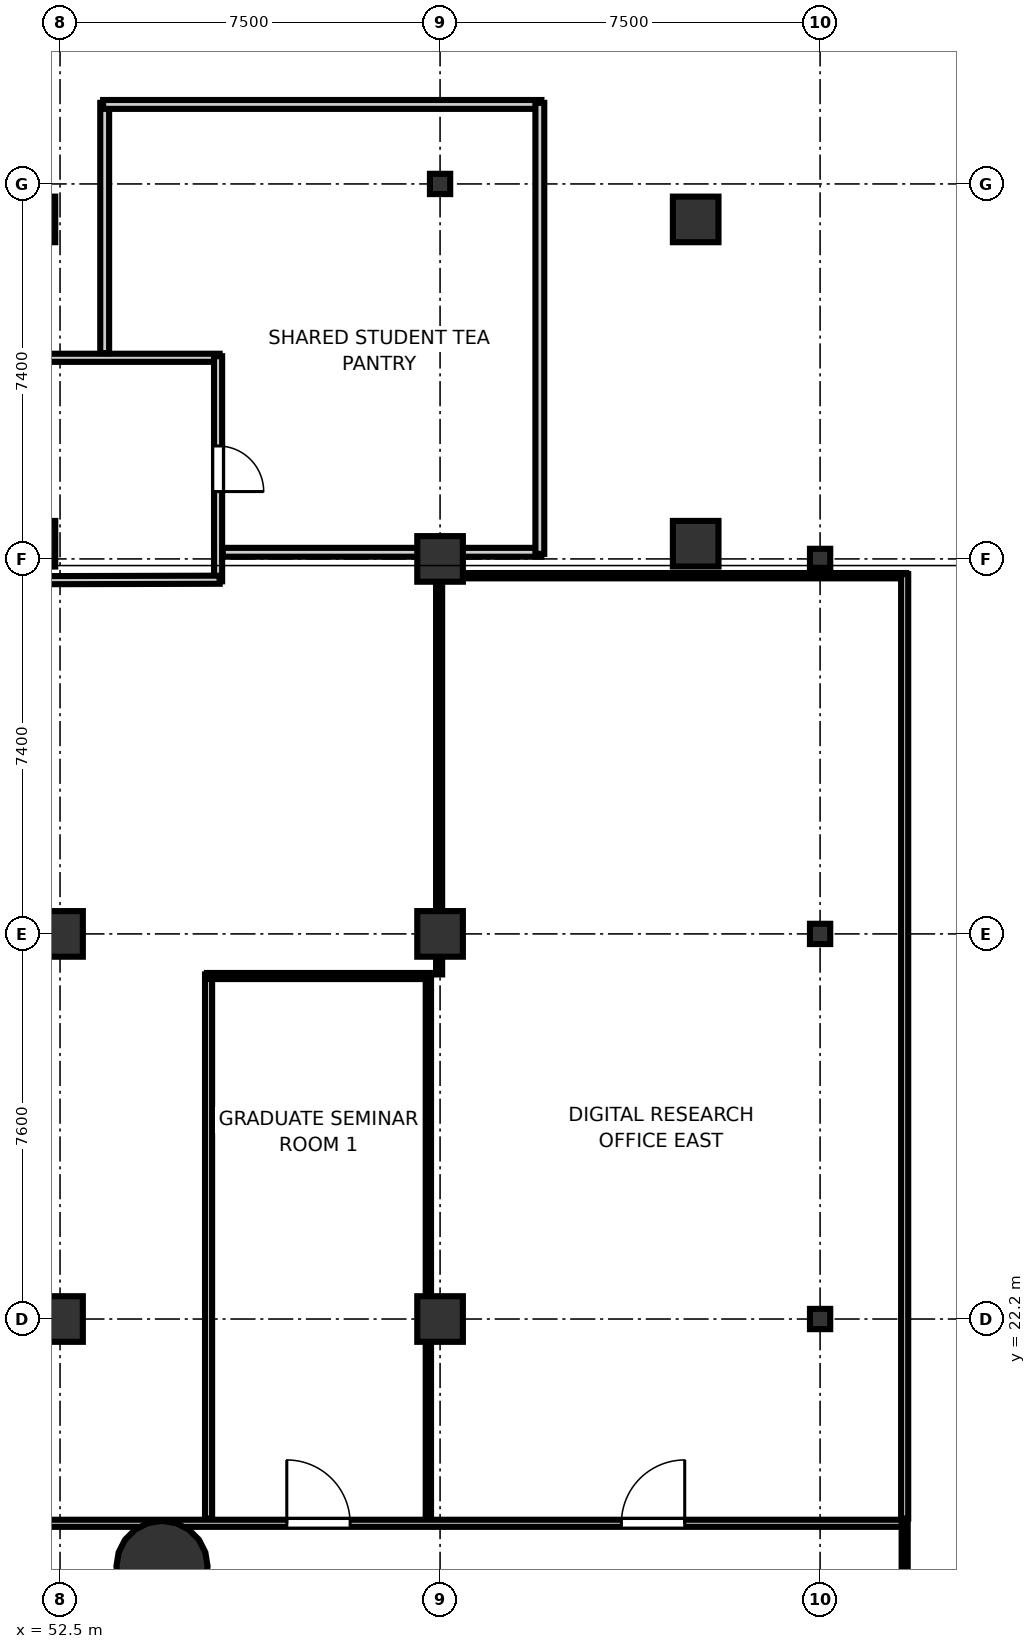
"""IFC4 building model, lengths in metres.
Left out: names, types, materials, properties, quantities, classifications, styles, units other than length and angle.
Written with IfcOpenShell. Run it as: python <this file> out.ifc"""

import sys

from ifc_helpers import new_model, si_unit, direction, frame, frame_2d, origin, origin_2d, place, context, subcontext, project, spatial, rectangle, hollow_circle, i_section, extrude, element, fill, save


model = new_model("IFC4")
c1 = context("Model", 3, precision=1e-05, world=origin(), true_north=direction((0.0, 1.0)))
c2 = subcontext(c1, "Body", "Model", "MODEL_VIEW")
j1 = project(units=[si_unit("LENGTHUNIT", "METRE"), si_unit("PLANEANGLEUNIT", "RADIAN")], contexts=[c1])
p1 = place(None, origin())
s1 = spatial("IfcSite", under=j1, at=p1, CompositionType="ELEMENT")
p2 = place(p1, origin())
s2 = spatial("IfcBuilding", under=s1, at=p2, CompositionType="ELEMENT")
p3 = place(p2, frame((0.0, 0.0, 11.0)))
s3 = spatial("IfcBuildingStorey", under=s2, at=p3, CompositionType="ELEMENT", Elevation=11.0)
p4 = place(p3, frame((54.512, 17.317, 0.0), z_axis=(0.0, 0.0, 1.0), x_axis=(1.0, 0.0, 0.0)))
e1 = element("IfcColumn", 1, at=p4, inside=s3, PredefinedType="COLUMN", context=c2, shape_type="SweptSolid", body=[
    extrude(hollow_circle(Radius=0.9, WallThickness=0.045, at=origin_2d()), origin(), (0.0, 0.0, 1.0), 4.8),
])
for number, where, z_axis, x_axis in (
    (2, (51.955, 43.9, 0.0), (0.0, 0.0, 1.0), (1.0, 0.0, 0.0)),
    (3, (51.955, 37.5, 0.0), (0.0, 0.0, 1.0), (1.0, 0.0, 0.0)),
    (4, (65.045, 43.9, 0.0), (0.0, 0.0, 1.0), (1.0, 0.0, 0.0)),
    (5, (65.045, 37.5, 0.0), (0.0, 0.0, 1.0), (1.0, 0.0, 0.0)),
    (6, (52.5, 22.2, 0.0), (0.0, 0.0, 1.0), (1.0, 0.0, 0.0)),
    (7, (52.5, 29.8, 0.0), (0.0, 0.0, 1.0), (1.0, 0.0, 0.0)),
    (8, (60.0, 22.2, 0.0), (0.0, 0.0, 1.0), (1.0, 0.0, 0.0)),
    (9, (60.0, 29.8, 0.0), (0.0, 0.0, 1.0), (1.0, 0.0, 0.0)),
    (10, (60.0, 37.2, 0.0), (0.0, 0.0, 1.0), (1.0, 0.0, 0.0)),
):
    element("IfcColumn", number, at=place(p3, frame(where, z_axis=z_axis, x_axis=x_axis)), inside=s3, PredefinedType="COLUMN", context=c2, shape_type="SweptSolid", body=[
        extrude(rectangle(XDim=0.9, YDim=0.9, at=origin_2d()), origin(), (0.0, 0.0, 1.0), 4.8),
    ])
for number, where, z_axis, x_axis in (
    (11, (60.0, 44.6, 0.0), (0.0, 0.0, 1.0), (1.0, 0.0, 0.0)),
    (12, (67.5, 22.2, 0.0), (0.0, 0.0, 1.0), (1.0, 0.0, 0.0)),
    (13, (67.5, 29.8, 0.0), (0.0, 0.0, 1.0), (1.0, 0.0, 0.0)),
    (14, (67.5, 37.2, 0.0), (0.0, 0.0, 1.0), (1.0, 0.0, 0.0)),
):
    element("IfcColumn", number, at=place(p3, frame(where, z_axis=z_axis, x_axis=x_axis)), inside=s3, PredefinedType="COLUMN", context=c2, shape_type="SweptSolid", body=[
        extrude(i_section(OverallWidth=0.4, OverallDepth=0.4, WebThickness=0.013, FlangeThickness=0.021, at=origin_2d()), origin(), (0.0, 0.0, 1.0), 4.8),
    ])
p5 = place(p3, frame((73.5, 46.0, 0.0), z_axis=(0.0, 0.0, 1.0), x_axis=(-0.707106781187, 0.707106781187, 0.0)))
e15 = element("IfcWall", 15, at=p5, inside=s3, PredefinedType="SOLIDWALL", context=c2, shape_type="SweptSolid", body=[
    extrude(rectangle(XDim=6.364, YDim=0.28, at=frame_2d((3.182, 0.0))), origin(), (0.0, 0.0, 1.0), 4.58),
])
p6 = place(p5, frame((1.982, 0.0, 0.9)))
e16 = element("IfcOpeningElement", 16, at=p6, cuts=e15, PredefinedType="OPENING", context=c2, shape_type="SweptSolid", body=[
    extrude(rectangle(XDim=2.4, YDim=2.6, at=frame_2d((1.2, 1.3))), frame((0.0, 0.15, 0.0), z_axis=(0.0, -1.0, 0.0), x_axis=(1.0, 0.0, 0.0)), (0.0, 0.0, 1.0), 0.3),
])
p7 = place(p3, frame((46.5, 41.169, 0.0), z_axis=(0.0, 0.0, 1.0), x_axis=(1.0, 0.0, 0.0)))
e17 = element("IfcWall", 17, at=p7, inside=s3, PredefinedType="PARTITIONING", context=c2, shape_type="SweptSolid", body=[
    extrude(rectangle(XDim=9.15, YDim=0.16, at=frame_2d((4.575, 0.0))), origin(), (0.0, 0.0, 1.0), 3.1),
])
p8 = place(p3, frame((55.619, 41.2, 0.0), z_axis=(0.0, 0.0, 1.0), x_axis=(0.0, -1.0, 0.0)))
e18 = element("IfcWall", 18, at=p8, inside=s3, PredefinedType="PARTITIONING", context=c2, shape_type="SweptSolid", body=[
    extrude(rectangle(XDim=4.442, YDim=0.16, at=frame_2d((2.221, 0.0))), origin(), (0.0, 0.0, 1.0), 3.1),
])
p9 = place(p8, frame((1.771, 0.0, 0.0)))
e19 = element("IfcOpeningElement", 19, at=p9, cuts=e18, PredefinedType="OPENING", context=c2, shape_type="SweptSolid", body=[
    extrude(rectangle(XDim=0.9, YDim=2.1, at=frame_2d((0.45, 1.05))), frame((0.0, 0.09, 0.0), z_axis=(0.0, -1.0, 0.0), x_axis=(1.0, 0.0, 0.0)), (0.0, 0.0, 1.0), 0.18),
])
p10 = place(p3, frame((55.65, 36.789, 0.0), z_axis=(0.0, 0.0, 1.0), x_axis=(-0.999996901459, -0.002489391821, 0.0)))
e20 = element("IfcWall", 20, at=p10, inside=s3, PredefinedType="PARTITIONING", context=c2, shape_type="SweptSolid", body=[
    extrude(rectangle(XDim=8.925, YDim=0.16, at=frame_2d((4.462, 0.0))), origin(), (0.0, 0.0, 1.0), 3.1),
])
p11 = place(p3, frame((42.3, 18.169, 0.0), z_axis=(0.0, 0.0, 1.0), x_axis=(1.0, 0.0, 0.0)))
e21 = element("IfcWall", 21, at=p11, inside=s3, PredefinedType="PARTITIONING", context=c2, shape_type="SweptSolid", body=[
    extrude(rectangle(XDim=26.9, YDim=0.14, at=frame_2d((13.45, 0.0))), origin(), (0.0, 0.0, 1.0), 3.1),
])
p12 = place(p11, frame((14.675, 0.0, 0.0)))
e22 = element("IfcOpeningElement", 22, at=p12, cuts=e21, PredefinedType="OPENING", context=c2, shape_type="SweptSolid", body=[
    extrude(rectangle(XDim=1.25, YDim=2.2, at=frame_2d((0.625, 1.1))), frame((0.0, 0.08, 0.0), z_axis=(0.0, -1.0, 0.0), x_axis=(1.0, 0.0, 0.0)), (0.0, 0.0, 1.0), 0.16),
])
p13 = place(p11, frame((21.278, 0.0, 0.0)))
e23 = element("IfcOpeningElement", 23, at=p13, cuts=e21, PredefinedType="OPENING", context=c2, shape_type="SweptSolid", body=[
    extrude(rectangle(XDim=1.25, YDim=2.2, at=frame_2d((0.625, 1.1))), frame((0.0, 0.08, 0.0), z_axis=(0.0, -1.0, 0.0), x_axis=(1.0, 0.0, 0.0)), (0.0, 0.0, 1.0), 0.16),
])
p14 = place(p3, frame((69.169, 18.2, 0.0), z_axis=(0.0, 0.0, 1.0), x_axis=(0.0, -1.0, 0.0)))
e24 = element("IfcWall", 24, at=p14, inside=s3, PredefinedType="PARTITIONING", context=c2, shape_type="SweptSolid", body=[
    extrude(rectangle(XDim=12.4, YDim=0.12, at=frame_2d((6.2, 0.0))), origin(), (0.0, 0.0, 1.0), 3.1),
])
p15 = place(p3, frame((55.431, 18.262, 0.0), z_axis=(0.0, 0.0, 1.0), x_axis=(0.0, 1.0, 0.0)))
e25 = element("IfcWall", 25, at=p15, inside=s3, PredefinedType="PARTITIONING", context=c2, shape_type="SweptSolid", body=[
    extrude(rectangle(XDim=10.738, YDim=0.14, at=frame_2d((5.369, 0.0))), origin(), (0.0, 0.0, 1.0), 3.1),
])
p16 = place(p3, frame((55.4, 28.969, 0.0), z_axis=(0.0, 0.0, 1.0), x_axis=(1.0, 0.0, 0.0)))
e26 = element("IfcWall", 26, at=p16, inside=s3, PredefinedType="PARTITIONING", context=c2, shape_type="SweptSolid", body=[
    extrude(rectangle(XDim=4.4, YDim=0.12, at=frame_2d((2.2, 0.0))), origin(), (0.0, 0.0, 1.0), 3.1),
])
p17 = place(p3, frame((59.769, 29.0, 0.0), z_axis=(0.0, 0.0, 1.0), x_axis=(0.0, -1.0, 0.0)))
e27 = element("IfcWall", 27, at=p17, inside=s3, PredefinedType="PARTITIONING", context=c2, shape_type="SweptSolid", body=[
    extrude(rectangle(XDim=10.738, YDim=0.105, at=frame_2d((5.369, 0.0))), origin(), (0.0, 0.0, 1.0), 3.1),
])
p18 = place(p3, frame((59.981, 29.0, 0.0), z_axis=(0.0, 0.0, 1.0), x_axis=(0.0, 1.0, 0.0)))
e28 = element("IfcWall", 28, at=p18, inside=s3, PredefinedType="PARTITIONING", context=c2, shape_type="SweptSolid", body=[
    extrude(rectangle(XDim=7.9, YDim=0.12, at=frame_2d((3.95, 0.0))), origin(), (0.0, 0.0, 1.0), 3.1),
])
p19 = place(p3, frame((59.95, 36.869, 0.0), z_axis=(0.0, 0.0, 1.0), x_axis=(1.0, 0.0, 0.0)))
e29 = element("IfcWall", 29, at=p19, inside=s3, PredefinedType="PARTITIONING", context=c2, shape_type="SweptSolid", body=[
    extrude(rectangle(XDim=9.25, YDim=0.105, at=frame_2d((4.625, 0.0))), origin(), (0.0, 0.0, 1.0), 3.1),
])
p20 = place(p3, frame((69.169, 36.9, 0.0), z_axis=(0.0, 0.0, 1.0), x_axis=(0.0, -1.0, 0.0)))
e30 = element("IfcWall", 30, at=p20, inside=s3, PredefinedType="PARTITIONING", context=c2, shape_type="SweptSolid", body=[
    extrude(rectangle(XDim=18.638, YDim=0.14, at=frame_2d((9.319, 0.0))), origin(), (0.0, 0.0, 1.0), 3.1),
])
p21 = place(p3, frame((62.0, 37.331, 0.0), z_axis=(0.0, 0.0, 1.0), x_axis=(-1.0, 0.0, 0.0)))
e31 = element("IfcWall", 31, at=p21, inside=s3, PredefinedType="PLUMBINGWALL", context=c2, shape_type="SweptSolid", body=[
    extrude(rectangle(XDim=6.288, YDim=0.175, at=frame_2d((3.144, 0.0))), origin(), (0.0, 0.0, 1.0), 3.1),
])
p22 = place(p3, frame((53.381, 41.262, 0.0), z_axis=(0.0, 0.0, 1.0), x_axis=(0.0, 1.0, 0.0)))
e32 = element("IfcWall", 32, at=p22, inside=s3, PredefinedType="PLUMBINGWALL", context=c2, shape_type="SweptSolid", body=[
    extrude(rectangle(XDim=4.938, YDim=0.175, at=frame_2d((2.469, 0.0))), origin(), (0.0, 0.0, 1.0), 3.1),
])
p23 = place(p3, frame((53.35, 46.169, 0.0), z_axis=(0.0, 0.0, 1.0), x_axis=(1.0, 0.0, 0.0)))
e33 = element("IfcWall", 33, at=p23, inside=s3, PredefinedType="PLUMBINGWALL", context=c2, shape_type="SweptSolid", body=[
    extrude(rectangle(XDim=8.65, YDim=0.175, at=frame_2d((4.325, 0.0))), origin(), (0.0, 0.0, 1.0), 3.1),
])
p24 = place(p3, frame((61.969, 46.2, 0.0), z_axis=(0.0, 0.0, 1.0), x_axis=(0.0, -1.0, 0.0)))
e34 = element("IfcWall", 34, at=p24, inside=s3, PredefinedType="PLUMBINGWALL", context=c2, shape_type="SweptSolid", body=[
    extrude(rectangle(XDim=8.9, YDim=0.175, at=frame_2d((4.45, 0.0))), origin(), (0.0, 0.0, 1.0), 3.1),
])
p25 = place(p9, origin())
e35 = element("IfcDoor", 35, at=p25, inside=s3, OperationType="SINGLE_SWING_RIGHT", PredefinedType="DOOR", context=c2, shape_type="SweptSolid", body=[
    extrude(rectangle(XDim=0.9, YDim=2.1, at=frame_2d((0.45, 1.05))), frame((0.0, 0.025, 0.0), z_axis=(0.0, -1.0, 0.0), x_axis=(1.0, 0.0, 0.0)), (0.0, 0.0, 1.0), 0.05),
])
fill(e19, e35)
p26 = place(p12, origin())
e36 = element("IfcDoor", 36, at=p26, inside=s3, OperationType="SINGLE_SWING_LEFT", PredefinedType="DOOR", context=c2, shape_type="SweptSolid", body=[
    extrude(rectangle(XDim=1.25, YDim=2.2, at=frame_2d((0.625, 1.1))), frame((0.0, 0.025, 0.0), z_axis=(0.0, -1.0, 0.0), x_axis=(1.0, 0.0, 0.0)), (0.0, 0.0, 1.0), 0.05),
])
fill(e22, e36)
p27 = place(p13, origin())
e37 = element("IfcDoor", 37, at=p27, inside=s3, OperationType="SINGLE_SWING_RIGHT", PredefinedType="DOOR", context=c2, shape_type="SweptSolid", body=[
    extrude(rectangle(XDim=1.25, YDim=2.2, at=frame_2d((0.625, 1.1))), frame((0.0, 0.025, 0.0), z_axis=(0.0, -1.0, 0.0), x_axis=(1.0, 0.0, 0.0)), (0.0, 0.0, 1.0), 0.05),
])
fill(e23, e37)
save(model, sys.argv[1])
